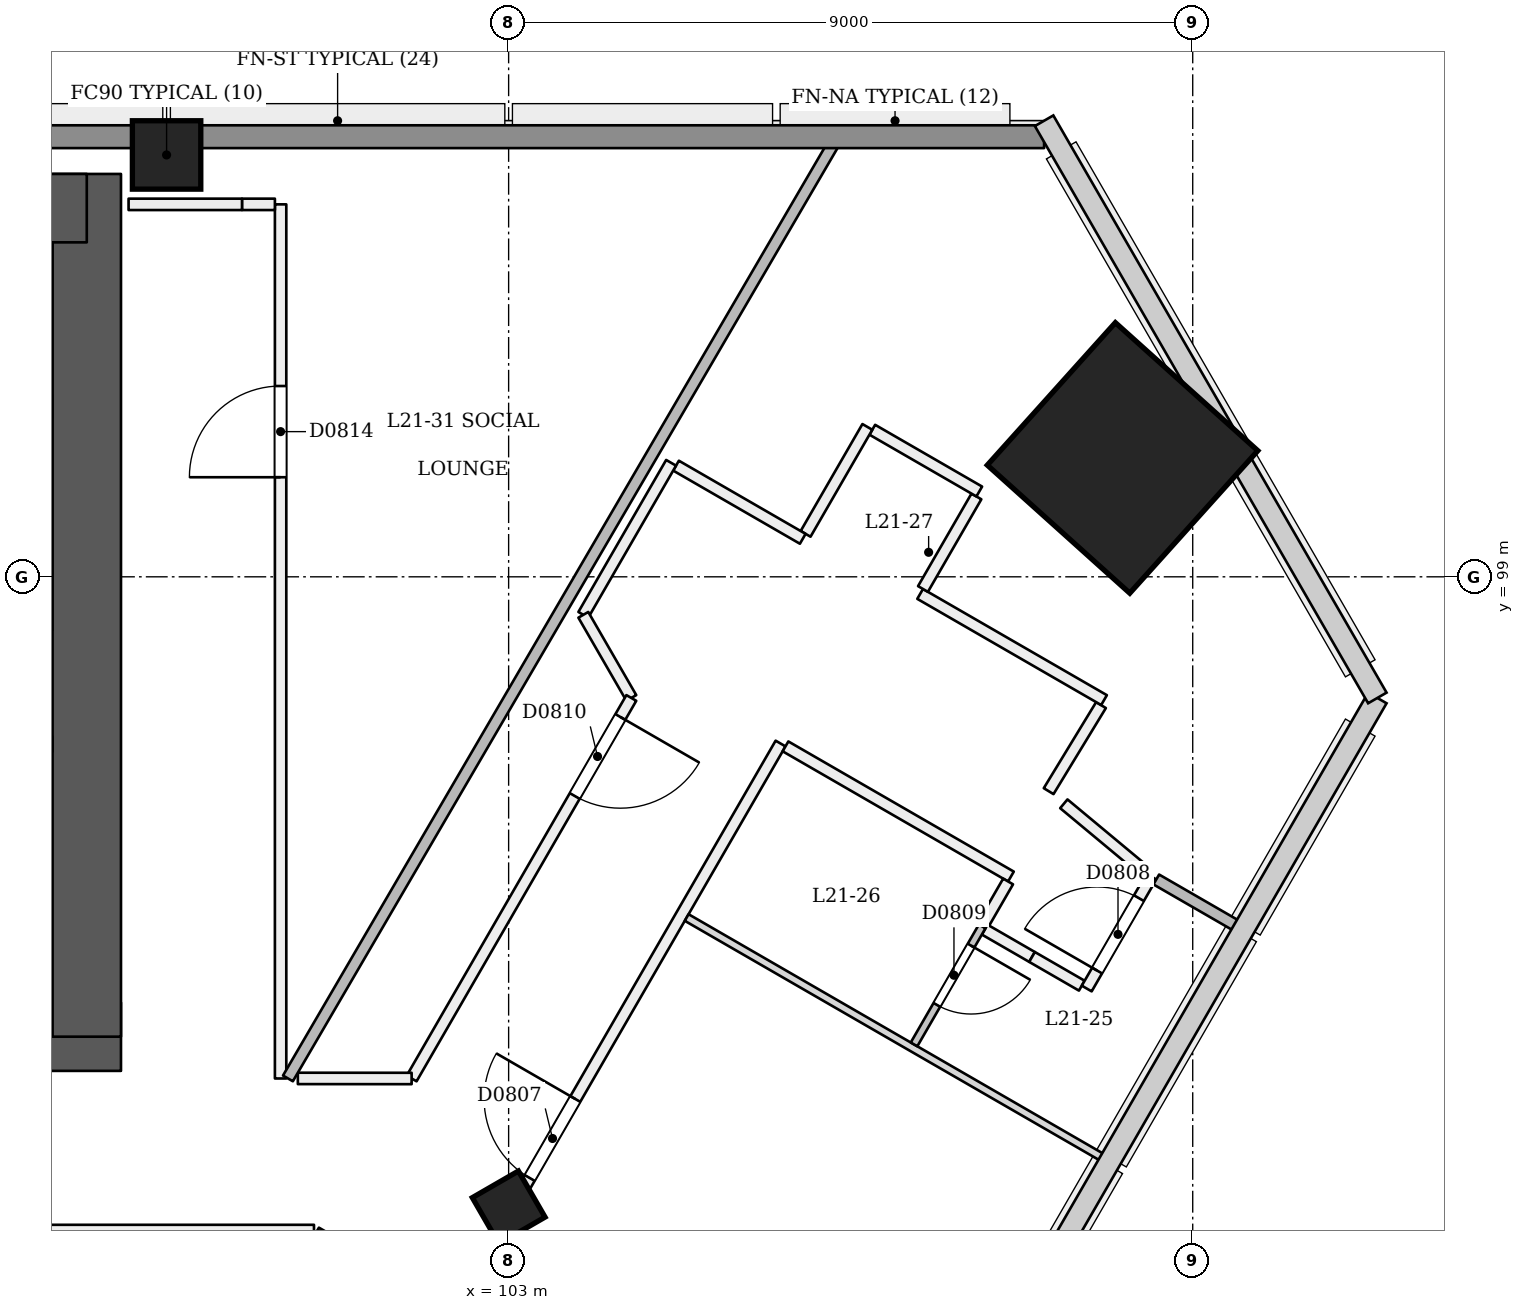
"""IFC4 building model, lengths in metres.
Left out: names, types, materials, properties, quantities, classifications, styles, units other than length and angle.
Written with IfcOpenShell. Run it as: python <this file> out.ifc"""

import sys

from ifc_helpers import new_model, si_unit, direction, frame, frame_2d, origin, origin_2d, place, context, subcontext, project, spatial, rectangle, extrude, element, fill, save


model = new_model("IFC4")
c1 = context("Model", 3, precision=1e-05, world=origin(), true_north=direction((0.0, 1.0)))
c2 = subcontext(c1, "Body", "Model", "MODEL_VIEW")
j1 = project(units=[si_unit("LENGTHUNIT", "METRE"), si_unit("PLANEANGLEUNIT", "RADIAN")], contexts=[c1])
p1 = place(None, origin())
s1 = spatial("IfcSite", under=j1, at=p1, CompositionType="ELEMENT")
p2 = place(p1, origin())
s2 = spatial("IfcBuilding", under=s1, at=p2, CompositionType="ELEMENT")
p3 = place(p2, frame((0.0, 0.0, 84.6)))
s3 = spatial("IfcBuildingStorey", under=s2, at=p3, CompositionType="ELEMENT", Elevation=84.6)
p4 = place(p3, frame((72.55, 92.95, 0.0), z_axis=(0.0, 0.0, 1.0), x_axis=(1.0, 0.0, 0.0)))
e1 = element("IfcWall", 1, at=p4, inside=s3, PredefinedType="SHEAR", context=c2, shape_type="SweptSolid", body=[
    extrude(rectangle(XDim=25.35, YDim=0.9, at=frame_2d((12.675, 0.0))), origin(), (0.0, 0.0, 1.0), 3.6),
])
p5 = place(p4, frame((1.25, 0.0, 0.0)))
e2 = element("IfcOpeningElement", 2, at=p5, cuts=e1, PredefinedType="OPENING", context=c2, shape_type="SweptSolid", body=[
    extrude(rectangle(XDim=1.2, YDim=2.1, at=frame_2d((0.6, 1.05))), frame((0.0, 0.46, 0.0), z_axis=(0.0, -1.0, 0.0), x_axis=(1.0, 0.0, 0.0)), (0.0, 0.0, 1.0), 0.921),
])
p6 = place(p4, frame((3.45, 0.0, 0.0)))
e3 = element("IfcOpeningElement", 3, at=p6, cuts=e1, PredefinedType="OPENING", context=c2, shape_type="SweptSolid", body=[
    extrude(rectangle(XDim=1.2, YDim=2.1, at=frame_2d((0.6, 1.05))), frame((0.0, 0.46, 0.0), z_axis=(0.0, -1.0, 0.0), x_axis=(1.0, 0.0, 0.0)), (0.0, 0.0, 1.0), 0.921),
])
p7 = place(p4, frame((13.45, 0.0, 0.0)))
e4 = element("IfcOpeningElement", 4, at=p7, cuts=e1, PredefinedType="OPENING", context=c2, shape_type="SweptSolid", body=[
    extrude(rectangle(XDim=1.2, YDim=2.1, at=frame_2d((0.6, 1.05))), frame((0.0, 0.46, 0.0), z_axis=(0.0, -1.0, 0.0), x_axis=(1.0, 0.0, 0.0)), (0.0, 0.0, 1.0), 0.921),
])
p8 = place(p4, frame((15.712, 0.0, 0.0)))
e5 = element("IfcOpeningElement", 5, at=p8, cuts=e1, PredefinedType="OPENING", context=c2, shape_type="SweptSolid", body=[
    extrude(rectangle(XDim=1.0, YDim=2.1, at=frame_2d((0.5, 1.05))), frame((0.0, 0.46, 0.0), z_axis=(0.0, -1.0, 0.0), x_axis=(1.0, 0.0, 0.0)), (0.0, 0.0, 1.0), 0.921),
])
p9 = place(p4, frame((18.35, 0.0, 0.0)))
e6 = element("IfcOpeningElement", 6, at=p9, cuts=e1, PredefinedType="OPENING", context=c2, shape_type="SweptSolid", body=[
    extrude(rectangle(XDim=1.0, YDim=2.1, at=frame_2d((0.5, 1.05))), frame((0.0, 0.46, 0.0), z_axis=(0.0, -1.0, 0.0), x_axis=(1.0, 0.0, 0.0)), (0.0, 0.0, 1.0), 0.921),
])
p10 = place(p4, frame((21.938, 0.0, 0.0)))
e7 = element("IfcOpeningElement", 7, at=p10, cuts=e1, PredefinedType="OPENING", context=c2, shape_type="SweptSolid", body=[
    extrude(rectangle(XDim=1.0, YDim=2.1, at=frame_2d((0.5, 1.05))), frame((0.0, 0.46, 0.0), z_axis=(0.0, -1.0, 0.0), x_axis=(1.0, 0.0, 0.0)), (0.0, 0.0, 1.0), 0.921),
])
p11 = place(p3, frame((97.45, 92.95, 0.0), z_axis=(0.0, 0.0, 1.0), x_axis=(0.0, 1.0, 0.0)))
e8 = element("IfcWall", 8, at=p11, inside=s3, PredefinedType="SHEAR", context=c2, shape_type="SweptSolid", body=[
    extrude(rectangle(XDim=11.35, YDim=0.9, at=frame_2d((5.675, 0.0))), origin(), (0.0, 0.0, 1.0), 3.6),
])
p12 = place(p3, frame((97.45, 103.85, 0.0), z_axis=(0.0, 0.0, 1.0), x_axis=(-1.0, 0.0, 0.0)))
e9 = element("IfcWall", 9, at=p12, inside=s3, PredefinedType="SHEAR", context=c2, shape_type="SweptSolid", body=[
    extrude(rectangle(XDim=25.35, YDim=0.9, at=frame_2d((12.675, 0.0))), origin(), (0.0, 0.0, 1.0), 3.6),
])
p13 = place(p3, frame((103.028, 90.657, -0.021), z_axis=(-0.022222852987, 0.038483477124, 0.999012095419), x_axis=(-0.500170003261, -0.865642105227, 0.022219664612)))
e10 = element("IfcColumn", 10, at=p13, inside=s3, PredefinedType="COLUMN", context=c2, shape_type="SweptSolid", body=[
    extrude(rectangle(XDim=0.7, YDim=0.7, at=origin_2d()), origin(), (0.0, 0.0, 1.0), 3.604),
])
p14 = place(p3, frame((111.111, 100.553, 0.0), z_axis=(-0.028403739082, 0.009219352065, 0.999554016126), x_axis=(0.500754860852, -0.865304138146, 0.022210759545)))
e11 = element("IfcColumn", 11, at=p14, inside=s3, PredefinedType="COLUMN", context=c2, shape_type="SweptSolid", body=[
    extrude(rectangle(XDim=2.52, YDim=2.52, at=origin_2d()), origin(), (0.0, 0.0, 1.0), 3.602),
])
p15 = place(p3, frame((98.5, 104.55, 0.0), z_axis=(0.0, 0.0, 1.0), x_axis=(1.0, 0.0, 0.0)))
e12 = element("IfcColumn", 12, at=p15, inside=s3, PredefinedType="COLUMN", context=c2, shape_type="SweptSolid", body=[
    extrude(rectangle(XDim=0.9, YDim=0.9, at=origin_2d()), origin(), (0.0, 0.0, 1.0), 3.6),
])
p16 = place(p3, frame((85.631, 60.527, 0.0), z_axis=(0.0, 0.0, 1.0), x_axis=(0.500002601959, 0.866023901537, 0.0)))
e13 = element("IfcWall", 13, at=p16, inside=s3, PredefinedType="PARTITIONING", context=c2, shape_type="SweptSolid", body=[
    extrude(rectangle(XDim=41.892, YDim=0.15, at=frame_2d((20.946, 0.0))), origin(), (0.0, 0.0, 1.0), 2.7),
])
p17 = place(p16, frame((3.184, 0.0, 0.0)))
e14 = element("IfcOpeningElement", 14, at=p17, cuts=e13, PredefinedType="OPENING", context=c2, shape_type="SweptSolid", body=[
    extrude(rectangle(XDim=1.2, YDim=2.1, at=frame_2d((0.6, 1.05))), frame((0.0, 0.085, 0.0), z_axis=(0.0, -1.0, 0.0), x_axis=(1.0, 0.0, 0.0)), (0.0, 0.0, 1.0), 0.171),
])
p18 = place(p16, frame((10.688, 0.0, 0.0)))
e15 = element("IfcOpeningElement", 15, at=p18, cuts=e13, PredefinedType="OPENING", context=c2, shape_type="SweptSolid", body=[
    extrude(rectangle(XDim=1.0, YDim=2.1, at=frame_2d((0.5, 1.05))), frame((0.0, 0.085, 0.0), z_axis=(0.0, -1.0, 0.0), x_axis=(1.0, 0.0, 0.0)), (0.0, 0.0, 1.0), 0.171),
])
p19 = place(p16, frame((14.042, 0.0, 0.0)))
e16 = element("IfcOpeningElement", 16, at=p19, cuts=e13, PredefinedType="OPENING", context=c2, shape_type="SweptSolid", body=[
    extrude(rectangle(XDim=1.0, YDim=2.1, at=frame_2d((0.5, 1.05))), frame((0.0, 0.085, 0.0), z_axis=(0.0, -1.0, 0.0), x_axis=(1.0, 0.0, 0.0)), (0.0, 0.0, 1.0), 0.171),
])
p20 = place(p16, frame((19.688, 0.0, 0.0)))
e17 = element("IfcOpeningElement", 17, at=p20, cuts=e13, PredefinedType="OPENING", context=c2, shape_type="SweptSolid", body=[
    extrude(rectangle(XDim=1.0, YDim=2.1, at=frame_2d((0.5, 1.05))), frame((0.0, 0.085, 0.0), z_axis=(0.0, -1.0, 0.0), x_axis=(1.0, 0.0, 0.0)), (0.0, 0.0, 1.0), 0.171),
])
p21 = place(p16, frame((21.897, 0.0, 0.0)))
e18 = element("IfcOpeningElement", 18, at=p21, cuts=e13, PredefinedType="OPENING", context=c2, shape_type="SweptSolid", body=[
    extrude(rectangle(XDim=1.0, YDim=2.1, at=frame_2d((0.5, 1.05))), frame((0.0, 0.085, 0.0), z_axis=(0.0, -1.0, 0.0), x_axis=(1.0, 0.0, 0.0)), (0.0, 0.0, 1.0), 0.171),
])
p22 = place(p16, frame((28.572, 0.0, 0.0)))
e19 = element("IfcOpeningElement", 19, at=p22, cuts=e13, PredefinedType="OPENING", context=c2, shape_type="SweptSolid", body=[
    extrude(rectangle(XDim=1.0, YDim=2.1, at=frame_2d((0.5, 1.05))), frame((0.0, 0.085, 0.0), z_axis=(0.0, -1.0, 0.0), x_axis=(1.0, 0.0, 0.0)), (0.0, 0.0, 1.0), 0.171),
])
p23 = place(p16, frame((35.292, 0.0, 0.0)))
e20 = element("IfcOpeningElement", 20, at=p23, cuts=e13, PredefinedType="OPENING", context=c2, shape_type="SweptSolid", body=[
    extrude(rectangle(XDim=1.2, YDim=2.1, at=frame_2d((0.6, 1.05))), frame((0.0, 0.085, 0.0), z_axis=(0.0, -1.0, 0.0), x_axis=(1.0, 0.0, 0.0)), (0.0, 0.0, 1.0), 0.171),
])
p24 = place(p3, frame((109.263, 94.358, 0.0), z_axis=(0.0, 0.0, 1.0), x_axis=(0.865999022067, -0.500045691691, 0.0)))
e21 = element("IfcWall", 21, at=p24, inside=s3, PredefinedType="PARTITIONING", context=c2, shape_type="SweptSolid", body=[
    extrude(rectangle(XDim=0.719, YDim=0.15, at=frame_2d((0.36, 0.0))), origin(), (0.0, 0.0, 1.0), 2.6),
])
p25 = place(p3, frame((109.886, 93.999, 0.0), z_axis=(0.0, 0.0, 1.0), x_axis=(0.866147934042, -0.499787711288, 0.0)))
e22 = element("IfcWall", 22, at=p25, inside=s3, PredefinedType="PARTITIONING", context=c2, shape_type="SweptSolid", body=[
    extrude(rectangle(XDim=0.756, YDim=0.15, at=frame_2d((0.378, 0.0))), origin(), (0.0, 0.0, 1.0), 3.1),
])
p26 = place(p3, frame((110.605, 93.583, 0.0), z_axis=(0.0, 0.0, 1.0), x_axis=(0.500062241894, 0.865989465428, 0.0)))
e23 = element("IfcWall", 23, at=p26, inside=s3, PredefinedType="PARTITIONING", context=c2, shape_type="SweptSolid", body=[
    extrude(rectangle(XDim=1.7, YDim=0.15, at=frame_2d((0.85, 0.0))), origin(), (0.0, 0.0, 1.0), 3.1),
])
p27 = place(p26, frame((0.273, 0.0, 0.0)))
e24 = element("IfcOpeningElement", 24, at=p27, cuts=e23, PredefinedType="OPENING", context=c2, shape_type="SweptSolid", body=[
    extrude(rectangle(XDim=1.1, YDim=2.1, at=frame_2d((0.55, 1.05))), frame((0.0, 0.085, 0.0), z_axis=(0.0, -1.0, 0.0), x_axis=(1.0, 0.0, 0.0)), (0.0, 0.0, 1.0), 0.171),
])
p28 = place(p3, frame((106.643, 96.769, 0.0), z_axis=(0.0, 0.0, 1.0), x_axis=(0.866032454348, -0.499987787867, 0.0)))
e25 = element("IfcWall", 25, at=p28, inside=s3, PredefinedType="PARTITIONING", context=c2, shape_type="SweptSolid", body=[
    extrude(rectangle(XDim=3.425, YDim=0.15, at=frame_2d((1.712, 0.0))), origin(), (0.0, 0.0, 1.0), 2.6),
])
p29 = place(p3, frame((109.571, 94.992, 0.0), z_axis=(0.0, 0.0, 1.0), x_axis=(-0.499946979623, -0.86605601295, 0.0)))
e26 = element("IfcWall", 26, at=p29, inside=s3, PredefinedType="PARTITIONING", context=c2, shape_type="SweptSolid", body=[
    extrude(rectangle(XDim=0.627, YDim=0.15, at=frame_2d((0.314, 0.0))), origin(), (0.0, 0.0, 1.0), 2.6),
])
p30 = place(p3, frame((111.399, 95.103, 0.0), z_axis=(0.0, 0.0, 1.0), x_axis=(-0.768628678723, 0.639695204175, 0.0)))
e27 = element("IfcWall", 27, at=p30, inside=s3, PredefinedType="PARTITIONING", context=c2, shape_type="SweptSolid", body=[
    extrude(rectangle(XDim=1.424, YDim=0.15, at=frame_2d((0.712, 0.0))), origin(), (0.0, 0.0, 1.0), 3.1),
])
p31 = place(p3, frame((110.104, 96.18, 0.0), z_axis=(0.0, 0.0, 1.0), x_axis=(0.519795010513, 0.854291020113, 0.0)))
e28 = element("IfcWall", 28, at=p31, inside=s3, PredefinedType="PARTITIONING", context=c2, shape_type="SweptSolid", body=[
    extrude(rectangle(XDim=1.325, YDim=0.15, at=frame_2d((0.663, 0.0))), origin(), (0.0, 0.0, 1.0), 2.6),
])
p32 = place(p3, frame((110.833, 97.378, 0.0), z_axis=(0.0, 0.0, 1.0), x_axis=(-0.866008041136, 0.500030071784, 0.0)))
e29 = element("IfcWall", 29, at=p32, inside=s3, PredefinedType="PARTITIONING", context=c2, shape_type="SweptSolid", body=[
    extrude(rectangle(XDim=2.794, YDim=0.15, at=frame_2d((1.397, 0.0))), origin(), (0.0, 0.0, 1.0), 2.6),
])
p33 = place(p3, frame((108.451, 98.84, 0.0), z_axis=(0.0, 0.0, 1.0), x_axis=(0.499967986367, 0.866043886075, 0.0)))
e30 = element("IfcWall", 30, at=p33, inside=s3, PredefinedType="PARTITIONING", context=c2, shape_type="SweptSolid", body=[
    extrude(rectangle(XDim=1.406, YDim=0.15, at=frame_2d((0.703, 0.0))), origin(), (0.0, 0.0, 1.0), 3.1),
])
for number, where, z_axis, x_axis in (
    (31, (109.192, 100.122, 0.0), (0.0, 0.0, 1.0), (-0.866, 0.5, 0.0)),
    (32, (107.719, 100.972, 0.0), (0.0, 0.0, 1.0), (-0.5, -0.866, 0.0)),
):
    element("IfcWall", number, at=place(p3, frame(where, z_axis=z_axis, x_axis=x_axis)), inside=s3, PredefinedType="PARTITIONING", context=c2, shape_type="SweptSolid", body=[
        extrude(rectangle(XDim=1.625, YDim=0.15, at=frame_2d((0.812, 0.0))), origin(), (0.0, 0.0, 1.0), 3.1),
    ])
p34 = place(p3, frame((106.869, 99.5, 0.0), z_axis=(0.0, 0.0, 1.0), x_axis=(-0.866033512162, 0.499985955615, 0.0)))
e33 = element("IfcWall", 33, at=p34, inside=s3, PredefinedType="PARTITIONING", context=c2, shape_type="SweptSolid", body=[
    extrude(rectangle(XDim=1.925, YDim=0.15, at=frame_2d((0.962, 0.0))), origin(), (0.0, 0.0, 1.0), 3.1),
])
p35 = place(p3, frame((105.137, 100.5, 0.0), z_axis=(0.0, 0.0, 1.0), x_axis=(-0.500027479704, -0.866009537788, 0.0)))
e34 = element("IfcWall", 34, at=p35, inside=s3, PredefinedType="PARTITIONING", context=c2, shape_type="SweptSolid", body=[
    extrude(rectangle(XDim=2.309, YDim=0.15, at=frame_2d((1.155, 0.0))), origin(), (0.0, 0.0, 1.0), 3.1),
])
p36 = place(p3, frame((103.983, 98.5, 0.0), z_axis=(0.0, 0.0, 1.0), x_axis=(0.500068251969, -0.865985994906, 0.0)))
e35 = element("IfcWall", 35, at=p36, inside=s3, PredefinedType="PARTITIONING", context=c2, shape_type="SweptSolid", body=[
    extrude(rectangle(XDim=1.263, YDim=0.15, at=frame_2d((0.631, 0.0))), origin(), (0.0, 0.0, 1.0), 3.1),
])
p37 = place(p3, frame((104.614, 97.406, 0.0), z_axis=(0.0, 0.0, 1.0), x_axis=(-0.4999954192, -0.866028048494, 0.0)))
e36 = element("IfcWall", 36, at=p37, inside=s3, PredefinedType="PARTITIONING", context=c2, shape_type="SweptSolid", body=[
    extrude(rectangle(XDim=5.781, YDim=0.15, at=frame_2d((2.89, 0.0))), origin(), (0.0, 0.0, 1.0), 3.1),
])
p38 = place(p37, frame((0.289, 0.0, 0.0)))
e37 = element("IfcOpeningElement", 37, at=p38, cuts=e36, PredefinedType="OPENING", context=c2, shape_type="SweptSolid", body=[
    extrude(rectangle(XDim=1.2, YDim=2.1, at=frame_2d((0.6, 1.05))), frame((0.0, 0.085, 0.0), z_axis=(0.0, -1.0, 0.0), x_axis=(1.0, 0.0, 0.0)), (0.0, 0.0, 1.0), 0.171),
])
p39 = place(p3, frame((101.724, 92.4, 0.0), z_axis=(0.0, 0.0, 1.0), x_axis=(-0.999999787242, 0.000652315582, 0.0)))
e38 = element("IfcWall", 38, at=p39, inside=s3, PredefinedType="PARTITIONING", context=c2, shape_type="SweptSolid", body=[
    extrude(rectangle(XDim=1.497, YDim=0.15, at=frame_2d((0.749, 0.0))), origin(), (0.0, 0.0, 1.0), 3.1),
])
p40 = place(p3, frame((88.0, 90.4, 0.0), z_axis=(0.0, 0.0, 1.0), x_axis=(1.0, 0.0, 0.0)))
e39 = element("IfcWall", 39, at=p40, inside=s3, PredefinedType="PARTITIONING", context=c2, shape_type="SweptSolid", body=[
    extrude(rectangle(XDim=12.439, YDim=0.15, at=frame_2d((6.22, 0.0))), origin(), (0.0, 0.0, 1.0), 3.1),
])
p41 = place(p3, frame((100.569, 90.4, 0.0), z_axis=(0.0, 0.0, 1.0), x_axis=(-0.499999613165, -0.866025627124, 0.0)))
e40 = element("IfcWall", 40, at=p41, inside=s3, PredefinedType="PARTITIONING", context=c2, shape_type="SweptSolid", body=[
    extrude(rectangle(XDim=31.008, YDim=0.15, at=frame_2d((15.504, 0.0))), origin(), (0.0, 0.0, 1.0), 3.1),
])
p42 = place(p41, frame((7.078, 0.0, 0.0)))
e41 = element("IfcOpeningElement", 41, at=p42, cuts=e40, PredefinedType="OPENING", context=c2, shape_type="SweptSolid", body=[
    extrude(rectangle(XDim=1.2, YDim=2.1, at=frame_2d((0.6, 1.05))), frame((0.0, 0.085, 0.0), z_axis=(0.0, -1.0, 0.0), x_axis=(1.0, 0.0, 0.0)), (0.0, 0.0, 1.0), 0.171),
])
p43 = place(p41, frame((17.162, 0.0, 0.0)))
e42 = element("IfcOpeningElement", 42, at=p43, cuts=e40, PredefinedType="OPENING", context=c2, shape_type="SweptSolid", body=[
    extrude(rectangle(XDim=1.2, YDim=2.1, at=frame_2d((0.6, 1.05))), frame((0.0, 0.085, 0.0), z_axis=(0.0, -1.0, 0.0), x_axis=(1.0, 0.0, 0.0)), (0.0, 0.0, 1.0), 0.171),
])
p44 = place(p3, frame((100.0, 92.4, 0.0), z_axis=(0.0, 0.0, 1.0), x_axis=(0.0, 1.0, 0.0)))
e43 = element("IfcWall", 43, at=p44, inside=s3, PredefinedType="PARTITIONING", context=c2, shape_type="SweptSolid", body=[
    extrude(rectangle(XDim=11.5, YDim=0.15, at=frame_2d((5.75, 0.0))), origin(), (0.0, 0.0, 1.0), 2.6),
])
p45 = place(p44, frame((7.91, 0.0, 0.0)))
e44 = element("IfcOpeningElement", 44, at=p45, cuts=e43, PredefinedType="OPENING", context=c2, shape_type="SweptSolid", body=[
    extrude(rectangle(XDim=1.2, YDim=2.1, at=frame_2d((0.6, 1.05))), frame((0.0, 0.085, 0.0), z_axis=(0.0, -1.0, 0.0), x_axis=(1.0, 0.0, 0.0)), (0.0, 0.0, 1.0), 0.171),
])
p46 = place(p3, frame((99.925, 103.9, 0.0), z_axis=(0.0, 0.0, 1.0), x_axis=(-1.0, 0.0, 0.0)))
e45 = element("IfcWall", 45, at=p46, inside=s3, PredefinedType="PARTITIONING", context=c2, shape_type="SweptSolid", body=[
    extrude(rectangle(XDim=0.433, YDim=0.15, at=frame_2d((0.217, 0.0))), origin(), (0.0, 0.0, 1.0), 2.6),
])
p47 = place(p3, frame((99.492, 103.9, 0.0), z_axis=(0.0, 0.0, 1.0), x_axis=(-1.0, 0.0, 0.0)))
e46 = element("IfcWall", 46, at=p47, inside=s3, PredefinedType="PARTITIONING", context=c2, shape_type="SweptSolid", body=[
    extrude(rectangle(XDim=1.492, YDim=0.15, at=frame_2d((0.746, 0.0))), origin(), (0.0, 0.0, 1.0), 3.1),
])
p48 = place(p3, frame((110.838, 91.345, 0.0), z_axis=(0.0, 0.0, 1.0), x_axis=(-0.866025401434, 0.500000004071, 0.0)))
e47 = element("IfcWall", 47, at=p48, inside=s3, PredefinedType="PARTITIONING", context=c2, shape_type="SweptSolid", body=[
    extrude(rectangle(XDim=6.345, YDim=0.1, at=frame_2d((3.173, 0.0))), origin(), (0.0, 0.0, 1.0), 2.6),
])
p49 = place(p3, frame((109.23, 94.401, 0.0), z_axis=(0.0, 0.0, 1.0), x_axis=(-0.499962169188, -0.866047244312, 0.0)))
e48 = element("IfcWall", 48, at=p49, inside=s3, PredefinedType="PARTITIONING", context=c2, shape_type="SweptSolid", body=[
    extrude(rectangle(XDim=1.793, YDim=0.1, at=frame_2d((0.896, 0.0))), origin(), (0.0, 0.0, 1.0), 3.1),
])
p50 = place(p49, frame((0.292, 0.0, 0.0)))
e49 = element("IfcOpeningElement", 49, at=p50, cuts=e48, PredefinedType="OPENING", context=c2, shape_type="SweptSolid", body=[
    extrude(rectangle(XDim=0.9, YDim=2.1, at=frame_2d((0.45, 1.05))), frame((0.0, 0.061, 0.0), z_axis=(0.0, -1.0, 0.0), x_axis=(1.0, 0.0, 0.0)), (0.0, 0.0, 1.0), 0.121),
])
p51 = place(p3, frame((112.599, 94.396, 0.0), z_axis=(0.0, 0.0, 1.0), x_axis=(-0.865989634427, 0.500061949227, 0.0)))
e50 = element("IfcWall", 50, at=p51, inside=s3, PredefinedType="PARTITIONING", context=c2, shape_type="SweptSolid", body=[
    extrude(rectangle(XDim=1.245, YDim=0.15, at=frame_2d((0.623, 0.0))), origin(), (0.0, 0.0, 1.0), 3.1),
])
p52 = place(p3, frame((107.392, 104.9, 0.0), z_axis=(0.0, 0.0, 1.0), x_axis=(-0.504080788187, -0.863656505204, 0.0)))
e51 = element("IfcWall", 51, at=p52, inside=s3, PredefinedType="PARTITIONING", context=c2, shape_type="SweptSolid", body=[
    extrude(rectangle(XDim=14.472, YDim=0.15, at=frame_2d((7.236, 0.0))), origin(), (0.0, 0.0, 1.0), 2.6),
])
p53 = place(p3, frame((59.955, 104.79, 0.0), z_axis=(0.0, 0.0, 1.0), x_axis=(1.0, 0.0, 0.0)))
e52 = element("IfcWall", 52, at=p53, inside=s3, PredefinedType="SOLIDWALL", context=c2, shape_type="SweptSolid", body=[
    extrude(rectangle(XDim=50.09, YDim=0.3, at=frame_2d((25.045, 0.0))), origin(), (0.0, 0.0, 1.0), 2.6),
])
p54 = place(p23, origin())
e53 = element("IfcDoor", 53, at=p54, inside=s3, OperationType="SINGLE_SWING_RIGHT", PredefinedType="NOTDEFINED", context=c2, shape_type="SweptSolid", body=[
    extrude(rectangle(XDim=1.2, YDim=2.1, at=frame_2d((0.6, 1.05))), frame((0.0, 0.025, 0.0), z_axis=(0.0, -1.0, 0.0), x_axis=(1.0, 0.0, 0.0)), (0.0, 0.0, 1.0), 0.05),
])
fill(e20, e53)
p55 = place(p27, origin())
e54 = element("IfcDoor", 54, at=p55, inside=s3, OperationType="SINGLE_SWING_LEFT", PredefinedType="NOTDEFINED", context=c2, shape_type="SweptSolid", body=[
    extrude(rectangle(XDim=1.1, YDim=2.1, at=frame_2d((0.55, 1.05))), frame((0.0, 0.025, 0.0), z_axis=(0.0, -1.0, 0.0), x_axis=(1.0, 0.0, 0.0)), (0.0, 0.0, 1.0), 0.05),
])
fill(e24, e54)
p56 = place(p50, origin())
e55 = element("IfcDoor", 55, at=p56, inside=s3, OperationType="SINGLE_SWING_LEFT", PredefinedType="NOTDEFINED", context=c2, shape_type="SweptSolid", body=[
    extrude(rectangle(XDim=0.9, YDim=2.1, at=frame_2d((0.45, 1.05))), frame((0.0, 0.025, 0.0), z_axis=(0.0, -1.0, 0.0), x_axis=(1.0, 0.0, 0.0)), (0.0, 0.0, 1.0), 0.05),
])
fill(e49, e55)
p57 = place(p38, origin())
e56 = element("IfcDoor", 56, at=p57, inside=s3, OperationType="SINGLE_SWING_LEFT", PredefinedType="NOTDEFINED", context=c2, shape_type="SweptSolid", body=[
    extrude(rectangle(XDim=1.2, YDim=2.1, at=frame_2d((0.6, 1.05))), frame((0.0, 0.025, 0.0), z_axis=(0.0, -1.0, 0.0), x_axis=(1.0, 0.0, 0.0)), (0.0, 0.0, 1.0), 0.05),
])
fill(e37, e56)
p58 = place(p45, origin())
e57 = element("IfcDoor", 57, at=p58, inside=s3, OperationType="SINGLE_SWING_LEFT", PredefinedType="NOTDEFINED", context=c2, shape_type="SweptSolid", body=[
    extrude(rectangle(XDim=1.2, YDim=2.1, at=frame_2d((0.6, 1.05))), frame((0.0, 0.025, 0.0), z_axis=(0.0, -1.0, 0.0), x_axis=(1.0, 0.0, 0.0)), (0.0, 0.0, 1.0), 0.05),
])
fill(e44, e57)
save(model, sys.argv[1])
